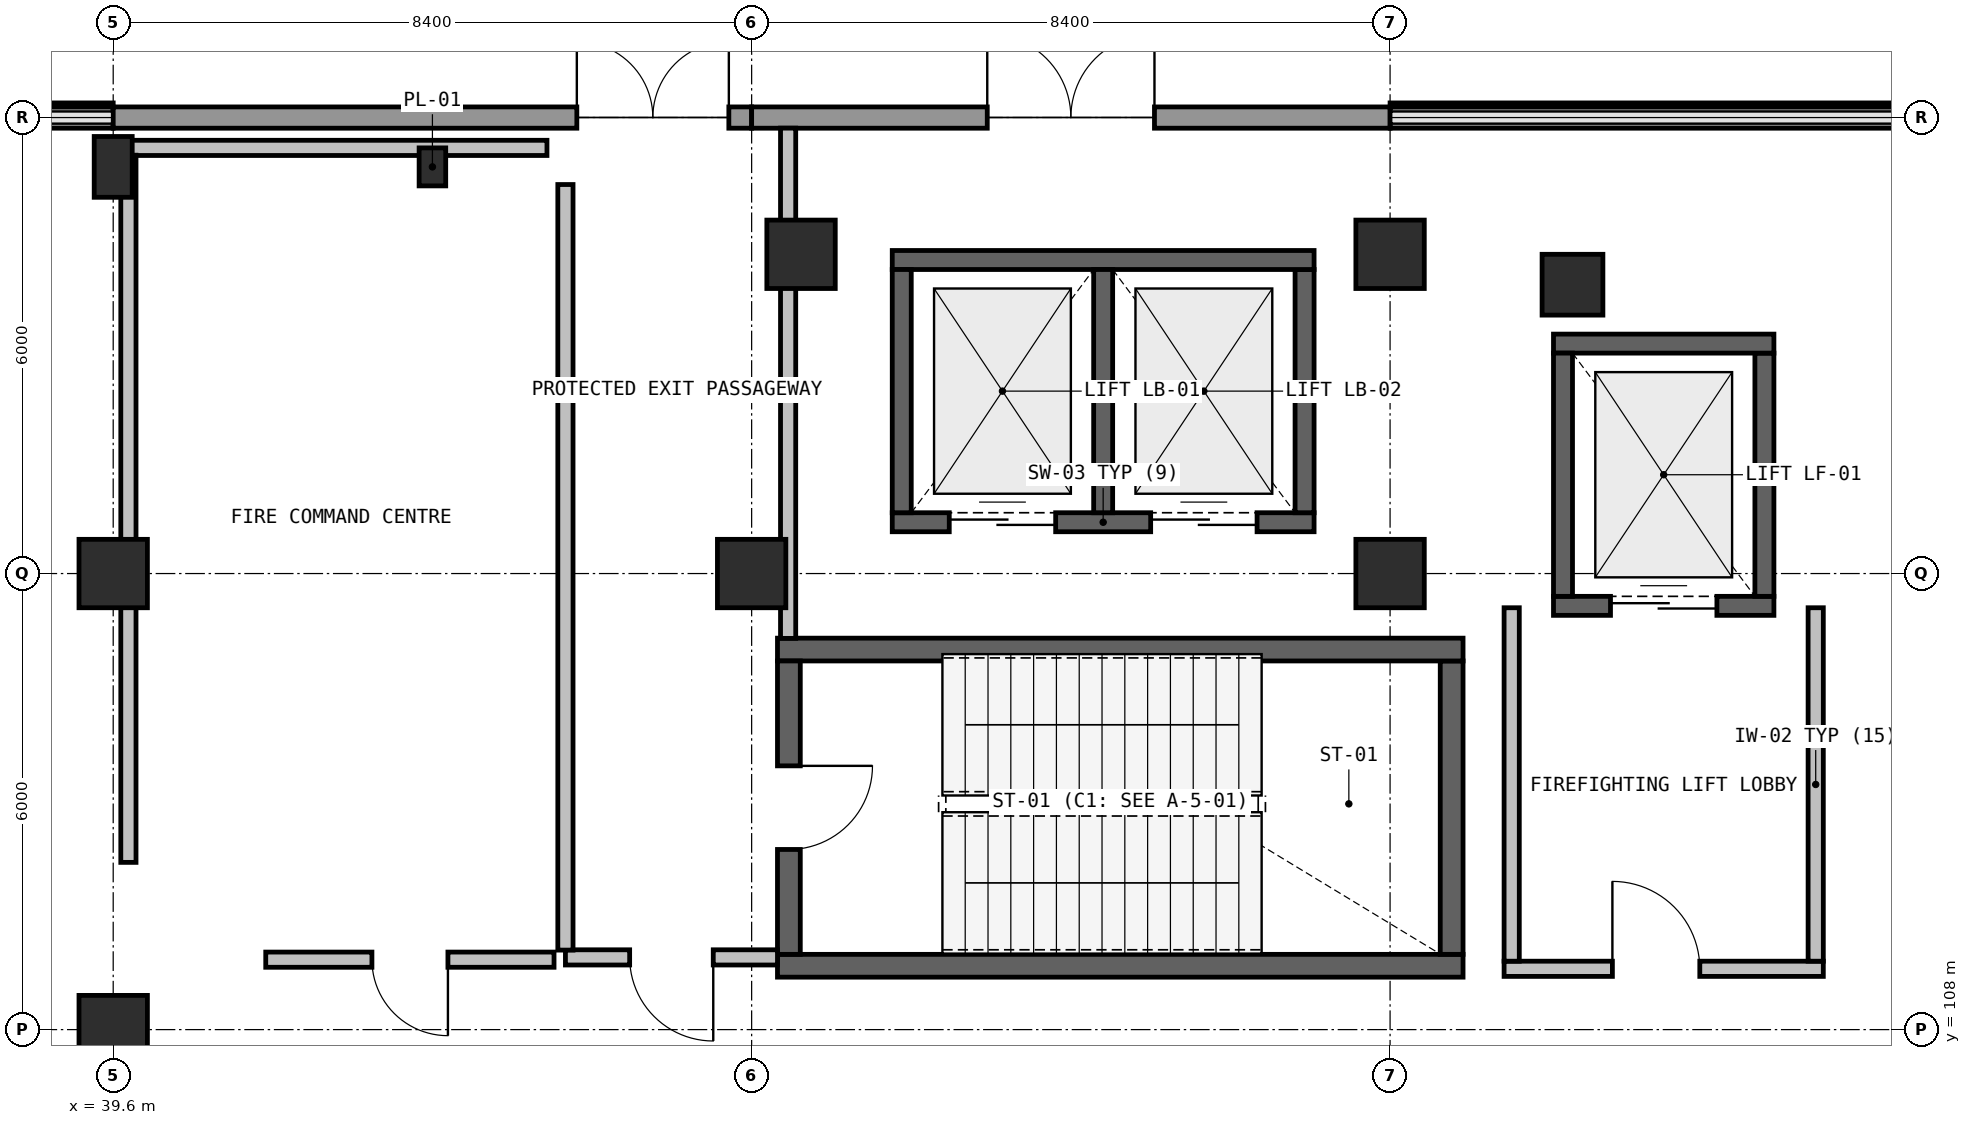
"""IFC4 building model, lengths in metres.
Left out: names, types, materials, properties, quantities, classifications, styles, units other than length and angle.
Written with IfcOpenShell. Run it as: python <this file> out.ifc"""

import sys

from ifc_helpers import new_model, si_unit, direction, frame, frame_2d, origin, origin_2d, place, context, subcontext, project, spatial, rectangle, extrude, element, fill, save


model = new_model("IFC4")
c1 = context("Model", 3, precision=1e-05, world=origin(), true_north=direction((0.0, 1.0)))
c2 = subcontext(c1, "Body", "Model", "MODEL_VIEW")
j1 = project(units=[si_unit("LENGTHUNIT", "METRE"), si_unit("PLANEANGLEUNIT", "RADIAN")], contexts=[c1])
p1 = place(None, origin())
s1 = spatial("IfcSite", under=j1, at=p1, CompositionType="ELEMENT")
p2 = place(p1, origin())
s2 = spatial("IfcBuilding", under=s1, at=p2, CompositionType="ELEMENT")
p3 = place(p2, origin())
s3 = spatial("IfcBuildingStorey", under=s2, at=p3, CompositionType="ELEMENT", Elevation=0.0)
p4 = place(p3, frame((58.8, 117.8, 0.0), z_axis=(0.0, 0.0, 1.0), x_axis=(1.0, 0.0, 0.0)))
e1 = element("IfcColumn", 1, at=p4, inside=s3, PredefinedType="COLUMN", context=c2, shape_type="SweptSolid", body=[
    extrude(rectangle(XDim=0.8, YDim=0.8, at=origin_2d()), origin(), (0.0, 0.0, 1.0), 5.4),
])
for number, where, z_axis, x_axis in (
    (2, (48.65, 118.2, 0.0), (0.0, 0.0, 1.0), (1.0, 0.0, 0.0)),
    (3, (56.4, 118.2, 0.0), (0.0, 0.0, 1.0), (1.0, 0.0, 0.0)),
    (4, (39.6, 108.0, 0.0), (0.0, 0.0, 1.0), (1.0, 0.0, 0.0)),
    (5, (39.6, 114.0, 0.0), (0.0, 0.0, 1.0), (1.0, 0.0, 0.0)),
):
    element("IfcColumn", number, at=place(p3, frame(where, z_axis=z_axis, x_axis=x_axis)), inside=s3, PredefinedType="COLUMN", context=c2, shape_type="SweptSolid", body=[
        extrude(rectangle(XDim=0.9, YDim=0.9, at=origin_2d()), origin(), (0.0, 0.0, 1.0), 5.4),
    ])
p5 = place(p3, frame((39.6, 119.35, 0.0), z_axis=(0.0, 0.0, 1.0), x_axis=(1.0, 0.0, 0.0)))
e6 = element("IfcColumn", 6, at=p5, inside=s3, PredefinedType="COLUMN", context=c2, shape_type="SweptSolid", body=[
    extrude(rectangle(XDim=0.5, YDim=0.8, at=origin_2d()), origin(), (0.0, 0.0, 1.0), 5.4),
])
for number, where, z_axis, x_axis in (
    (7, (48.0, 114.0, 0.0), (0.0, 0.0, 1.0), (1.0, 0.0, 0.0)),
    (8, (56.4, 114.0, 0.0), (0.0, 0.0, 1.0), (1.0, 0.0, 0.0)),
):
    element("IfcColumn", number, at=place(p3, frame(where, z_axis=z_axis, x_axis=x_axis)), inside=s3, PredefinedType="COLUMN", context=c2, shape_type="SweptSolid", body=[
        extrude(rectangle(XDim=0.9, YDim=0.9, at=origin_2d()), origin(), (0.0, 0.0, 1.0), 5.4),
    ])
p6 = place(p3, frame((43.8, 119.35, 0.0), z_axis=(0.0, 0.0, 1.0), x_axis=(1.0, 0.0, 0.0)))
e9 = element("IfcColumn", 9, at=p6, inside=s3, PredefinedType="PILASTER", context=c2, shape_type="SweptSolid", body=[
    extrude(rectangle(XDim=0.35, YDim=0.5, at=origin_2d()), origin(), (0.0, 0.0, 1.0), 5.4),
])
p7 = place(p3, frame((31.202, 119.999, 0.0), z_axis=(0.0, 0.0, 1.0), x_axis=(1.0, 0.0, 0.0)))
e10 = element("IfcWall", 10, at=p7, inside=s3, PredefinedType="SOLIDWALL", context=c2, shape_type="SweptSolid", body=[
    extrude(rectangle(XDim=8.396, YDim=0.28, at=frame_2d((4.198, 0.0))), origin(), (0.0, 0.0, 1.0), 0.94),
])
p8 = place(p3, frame((39.6, 119.999, 0.0), z_axis=(0.0, 0.0, 1.0), x_axis=(1.0, 0.0, 0.0)))
e11 = element("IfcWall", 11, at=p8, inside=s3, PredefinedType="SOLIDWALL", context=c2, shape_type="SweptSolid", body=[
    extrude(rectangle(XDim=8.4, YDim=0.28, at=frame_2d((4.2, 0.0))), origin(), (0.0, 0.0, 1.0), 5.08),
])
p9 = place(p8, frame((6.1, 0.0, 0.0)))
e12 = element("IfcOpeningElement", 12, at=p9, cuts=e11, PredefinedType="OPENING", context=c2, shape_type="SweptSolid", body=[
    extrude(rectangle(XDim=2.0, YDim=2.3, at=frame_2d((1.0, 1.15))), frame((0.0, 0.15, 0.0), z_axis=(0.0, -1.0, 0.0), x_axis=(1.0, 0.0, 0.0)), (0.0, 0.0, 1.0), 0.3),
])
p10 = place(p3, frame((48.0, 119.999, 0.0), z_axis=(0.0, 0.0, 1.0), x_axis=(1.0, 0.0, 0.0)))
e13 = element("IfcWall", 13, at=p10, inside=s3, PredefinedType="SOLIDWALL", context=c2, shape_type="SweptSolid", body=[
    extrude(rectangle(XDim=8.4, YDim=0.28, at=frame_2d((4.2, 0.0))), origin(), (0.0, 0.0, 1.0), 5.08),
])
p11 = place(p10, frame((3.1, 0.0, 0.0)))
e14 = element("IfcOpeningElement", 14, at=p11, cuts=e13, PredefinedType="OPENING", context=c2, shape_type="SweptSolid", body=[
    extrude(rectangle(XDim=2.2, YDim=2.35, at=frame_2d((1.1, 1.175))), frame((0.0, 0.15, 0.0), z_axis=(0.0, -1.0, 0.0), x_axis=(1.0, 0.0, 0.0)), (0.0, 0.0, 1.0), 0.3),
])
p12 = place(p3, frame((56.402, 119.999, 0.0), z_axis=(0.0, 0.0, 1.0), x_axis=(1.0, 0.0, 0.0)))
e15 = element("IfcWall", 15, at=p12, inside=s3, PredefinedType="SOLIDWALL", context=c2, shape_type="SweptSolid", body=[
    extrude(rectangle(XDim=8.396, YDim=0.28, at=frame_2d((4.198, 0.0))), origin(), (0.0, 0.0, 1.0), 0.94),
])
p13 = place(p3, frame((48.34, 108.84, 0.0), z_axis=(0.0, 0.0, 1.0), x_axis=(1.0, 0.0, 0.0)))
e16 = element("IfcWall", 16, at=p13, inside=s3, PredefinedType="SHEAR", context=c2, shape_type="SweptSolid", body=[
    extrude(rectangle(XDim=9.02, YDim=0.3, at=frame_2d((4.51, 0.0))), origin(), (0.0, 0.0, 1.0), 5.08),
])
p14 = place(p3, frame((57.21, 108.99, 0.0), z_axis=(0.0, 0.0, 1.0), x_axis=(0.0, 1.0, 0.0)))
e17 = element("IfcWall", 17, at=p14, inside=s3, PredefinedType="SHEAR", context=c2, shape_type="SweptSolid", body=[
    extrude(rectangle(XDim=3.86, YDim=0.3, at=frame_2d((1.93, 0.0))), origin(), (0.0, 0.0, 1.0), 5.08),
])
p15 = place(p3, frame((57.36, 113.0, 0.0), z_axis=(0.0, 0.0, 1.0), x_axis=(-1.0, 0.0, 0.0)))
e18 = element("IfcWall", 18, at=p15, inside=s3, PredefinedType="SHEAR", context=c2, shape_type="SweptSolid", body=[
    extrude(rectangle(XDim=9.02, YDim=0.3, at=frame_2d((4.51, 0.0))), origin(), (0.0, 0.0, 1.0), 5.08),
])
p16 = place(p3, frame((48.49, 112.85, 0.0), z_axis=(0.0, 0.0, 1.0), x_axis=(0.0, -1.0, 0.0)))
e19 = element("IfcWall", 19, at=p16, inside=s3, PredefinedType="SHEAR", context=c2, shape_type="SweptSolid", body=[
    extrude(rectangle(XDim=3.86, YDim=0.3, at=frame_2d((1.93, 0.0))), origin(), (0.0, 0.0, 1.0), 5.08),
])
p17 = place(p16, frame((1.38, 0.0, 0.0)))
e20 = element("IfcOpeningElement", 20, at=p17, cuts=e19, PredefinedType="OPENING", context=c2, shape_type="SweptSolid", body=[
    extrude(rectangle(XDim=1.1, YDim=2.15, at=frame_2d((0.55, 1.075))), frame((0.0, 0.16, 0.0), z_axis=(0.0, -1.0, 0.0), x_axis=(1.0, 0.0, 0.0)), (0.0, 0.0, 1.0), 0.32),
])
p18 = place(p3, frame((57.9, 108.8, 0.0), z_axis=(0.0, 0.0, 1.0), x_axis=(1.0, 0.0, 0.0)))
e21 = element("IfcWall", 21, at=p18, inside=s3, PredefinedType="SOLIDWALL", context=c2, shape_type="SweptSolid", body=[
    extrude(rectangle(XDim=4.2, YDim=0.2, at=frame_2d((2.1, 0.0))), origin(), (0.0, 0.0, 1.0), 5.08),
])
p19 = place(p18, frame((1.425, 0.0, 0.0)))
e22 = element("IfcOpeningElement", 22, at=p19, cuts=e21, PredefinedType="OPENING", context=c2, shape_type="SweptSolid", body=[
    extrude(rectangle(XDim=1.15, YDim=2.15, at=frame_2d((0.575, 1.075))), frame((0.0, 0.11, 0.0), z_axis=(0.0, -1.0, 0.0), x_axis=(1.0, 0.0, 0.0)), (0.0, 0.0, 1.0), 0.22),
])
for number, where, z_axis, x_axis in (
    (23, (62.0, 108.9, 0.0), (0.0, 0.0, 1.0), (0.0, 1.0, 0.0)),
    (24, (58.0, 113.55, 0.0), (0.0, 0.0, 1.0), (0.0, -1.0, 0.0)),
):
    element("IfcWall", number, at=place(p3, frame(where, z_axis=z_axis, x_axis=x_axis)), inside=s3, PredefinedType="SOLIDWALL", context=c2, shape_type="SweptSolid", body=[
        extrude(rectangle(XDim=4.65, YDim=0.2, at=frame_2d((2.325, 0.0))), origin(), (0.0, 0.0, 1.0), 5.08),
    ])
p20 = place(p3, frame((58.55, 113.575, 0.0), z_axis=(0.0, 0.0, 1.0), x_axis=(1.0, 0.0, 0.0)))
e25 = element("IfcWall", 25, at=p20, inside=s3, PredefinedType="SHEAR", context=c2, shape_type="SweptSolid", body=[
    extrude(rectangle(XDim=2.9, YDim=0.25, at=frame_2d((1.45, 0.0))), origin(), (0.0, 0.0, 1.0), 5.08),
])
p21 = place(p20, frame((0.75, 0.0, 0.0)))
e26 = element("IfcOpeningElement", 26, at=p21, cuts=e25, PredefinedType="OPENING", context=c2, shape_type="SweptSolid", body=[
    extrude(rectangle(XDim=1.4, YDim=2.15, at=frame_2d((0.7, 1.075))), frame((0.0, 0.135, 0.0), z_axis=(0.0, -1.0, 0.0), x_axis=(1.0, 0.0, 0.0)), (0.0, 0.0, 1.0), 0.27),
])
p22 = place(p3, frame((61.325, 113.7, 0.0), z_axis=(0.0, 0.0, 1.0), x_axis=(0.0, 1.0, 0.0)))
e27 = element("IfcWall", 27, at=p22, inside=s3, PredefinedType="SHEAR", context=c2, shape_type="SweptSolid", body=[
    extrude(rectangle(XDim=3.2, YDim=0.25, at=frame_2d((1.6, 0.0))), origin(), (0.0, 0.0, 1.0), 5.08),
])
p23 = place(p3, frame((61.45, 117.025, 0.0), z_axis=(0.0, 0.0, 1.0), x_axis=(-1.0, 0.0, 0.0)))
e28 = element("IfcWall", 28, at=p23, inside=s3, PredefinedType="SHEAR", context=c2, shape_type="SweptSolid", body=[
    extrude(rectangle(XDim=2.9, YDim=0.25, at=frame_2d((1.45, 0.0))), origin(), (0.0, 0.0, 1.0), 5.08),
])
p24 = place(p3, frame((58.675, 116.9, 0.0), z_axis=(0.0, 0.0, 1.0), x_axis=(0.0, -1.0, 0.0)))
e29 = element("IfcWall", 29, at=p24, inside=s3, PredefinedType="SHEAR", context=c2, shape_type="SweptSolid", body=[
    extrude(rectangle(XDim=3.2, YDim=0.25, at=frame_2d((1.6, 0.0))), origin(), (0.0, 0.0, 1.0), 5.08),
])
p25 = place(p3, frame((49.85, 114.675, 0.0), z_axis=(0.0, 0.0, 1.0), x_axis=(1.0, 0.0, 0.0)))
e30 = element("IfcWall", 30, at=p25, inside=s3, PredefinedType="SHEAR", context=c2, shape_type="SweptSolid", body=[
    extrude(rectangle(XDim=5.55, YDim=0.25, at=frame_2d((2.775, 0.0))), origin(), (0.0, 0.0, 1.0), 5.08),
])
p26 = place(p25, frame((0.75, 0.0, 0.0)))
e31 = element("IfcOpeningElement", 31, at=p26, cuts=e30, PredefinedType="OPENING", context=c2, shape_type="SweptSolid", body=[
    extrude(rectangle(XDim=1.4, YDim=2.2, at=frame_2d((0.7, 1.1))), frame((0.0, 0.135, 0.0), z_axis=(0.0, -1.0, 0.0), x_axis=(1.0, 0.0, 0.0)), (0.0, 0.0, 1.0), 0.27),
])
p27 = place(p25, frame((3.4, 0.0, 0.0)))
e32 = element("IfcOpeningElement", 32, at=p27, cuts=e30, PredefinedType="OPENING", context=c2, shape_type="SweptSolid", body=[
    extrude(rectangle(XDim=1.4, YDim=2.2, at=frame_2d((0.7, 1.1))), frame((0.0, 0.135, 0.0), z_axis=(0.0, -1.0, 0.0), x_axis=(1.0, 0.0, 0.0)), (0.0, 0.0, 1.0), 0.27),
])
p28 = place(p3, frame((55.275, 114.8, 0.0), z_axis=(0.0, 0.0, 1.0), x_axis=(0.0, 1.0, 0.0)))
e33 = element("IfcWall", 33, at=p28, inside=s3, PredefinedType="SHEAR", context=c2, shape_type="SweptSolid", body=[
    extrude(rectangle(XDim=3.2, YDim=0.25, at=frame_2d((1.6, 0.0))), origin(), (0.0, 0.0, 1.0), 5.08),
])
p29 = place(p3, frame((55.4, 118.125, 0.0), z_axis=(0.0, 0.0, 1.0), x_axis=(-1.0, 0.0, 0.0)))
e34 = element("IfcWall", 34, at=p29, inside=s3, PredefinedType="SHEAR", context=c2, shape_type="SweptSolid", body=[
    extrude(rectangle(XDim=5.55, YDim=0.25, at=frame_2d((2.775, 0.0))), origin(), (0.0, 0.0, 1.0), 5.08),
])
for number, where, z_axis, x_axis in (
    (35, (49.975, 118.0, 0.0), (0.0, 0.0, 1.0), (0.0, -1.0, 0.0)),
    (36, (52.625, 114.8, 0.0), (0.0, 0.0, 1.0), (0.0, 1.0, 0.0)),
):
    element("IfcWall", number, at=place(p3, frame(where, z_axis=z_axis, x_axis=x_axis)), inside=s3, PredefinedType="SHEAR", context=c2, shape_type="SweptSolid", body=[
        extrude(rectangle(XDim=3.2, YDim=0.25, at=frame_2d((1.6, 0.0))), origin(), (0.0, 0.0, 1.0), 5.08),
    ])
p30 = place(p3, frame((48.48, 119.86, 0.0), z_axis=(0.0, 0.0, 1.0), x_axis=(0.0, -1.0, 0.0)))
e37 = element("IfcWall", 37, at=p30, inside=s3, PredefinedType="SOLIDWALL", context=c2, shape_type="SweptSolid", body=[
    extrude(rectangle(XDim=6.713, YDim=0.2, at=frame_2d((3.356, 0.0))), origin(), (0.0, 0.0, 1.0), 5.08),
])
p31 = place(p3, frame((48.34, 108.95, 0.0), z_axis=(0.0, 0.0, 1.0), x_axis=(-1.0, 0.0, 0.0)))
e38 = element("IfcWall", 38, at=p31, inside=s3, PredefinedType="SOLIDWALL", context=c2, shape_type="SweptSolid", body=[
    extrude(rectangle(XDim=2.79, YDim=0.2, at=frame_2d((1.395, 0.0))), origin(), (0.0, 0.0, 1.0), 5.08),
])
p32 = place(p31, frame((0.845, 0.0, 0.0)))
e39 = element("IfcOpeningElement", 39, at=p32, cuts=e38, PredefinedType="OPENING", context=c2, shape_type="SweptSolid", body=[
    extrude(rectangle(XDim=1.1, YDim=2.15, at=frame_2d((0.55, 1.075))), frame((0.0, 0.11, 0.0), z_axis=(0.0, -1.0, 0.0), x_axis=(1.0, 0.0, 0.0)), (0.0, 0.0, 1.0), 0.22),
])
p33 = place(p3, frame((45.55, 109.046, 0.0), z_axis=(0.0, 0.0, 1.0), x_axis=(0.0, 1.0, 0.0)))
e40 = element("IfcWall", 40, at=p33, inside=s3, PredefinedType="SOLIDWALL", context=c2, shape_type="SweptSolid", body=[
    extrude(rectangle(XDim=10.072, YDim=0.2, at=frame_2d((5.036, 0.0))), origin(), (0.0, 0.0, 1.0), 5.08),
])
p34 = place(p3, frame((39.761, 119.6, 0.0), z_axis=(0.0, 0.0, 1.0), x_axis=(1.0, 0.0, 0.0)))
e41 = element("IfcWall", 41, at=p34, inside=s3, PredefinedType="SOLIDWALL", context=c2, shape_type="SweptSolid", body=[
    extrude(rectangle(XDim=5.546, YDim=0.2, at=frame_2d((2.773, 0.0))), origin(), (0.0, 0.0, 1.0), 5.08),
])
p35 = place(p3, frame((45.4, 108.92, 0.0), z_axis=(0.0, 0.0, 1.0), x_axis=(-1.0, 0.0, 0.0)))
e42 = element("IfcWall", 42, at=p35, inside=s3, PredefinedType="SOLIDWALL", context=c2, shape_type="SweptSolid", body=[
    extrude(rectangle(XDim=3.793, YDim=0.2, at=frame_2d((1.896, 0.0))), origin(), (0.0, 0.0, 1.0), 5.08),
])
p36 = place(p35, frame((1.396, 0.0, 0.0)))
e43 = element("IfcOpeningElement", 43, at=p36, cuts=e42, PredefinedType="OPENING", context=c2, shape_type="SweptSolid", body=[
    extrude(rectangle(XDim=1.0, YDim=2.15, at=frame_2d((0.5, 1.075))), frame((0.0, 0.11, 0.0), z_axis=(0.0, -1.0, 0.0), x_axis=(1.0, 0.0, 0.0)), (0.0, 0.0, 1.0), 0.22),
])
p37 = place(p3, frame((39.8, 110.2, 0.0), z_axis=(0.0, 0.0, 1.0), x_axis=(0.0, 1.0, 0.0)))
e44 = element("IfcWall", 44, at=p37, inside=s3, PredefinedType="SOLIDWALL", context=c2, shape_type="SweptSolid", body=[
    extrude(rectangle(XDim=9.304, YDim=0.2, at=frame_2d((4.652, 0.0))), origin(), (0.0, 0.0, 1.0), 4.33),
])
p38 = place(p9, origin())
e45 = element("IfcDoor", 45, at=p38, inside=s3, OperationType="DOUBLE_DOOR_SINGLE_SWING", PredefinedType="DOOR", context=c2, shape_type="SweptSolid", body=[
    extrude(rectangle(XDim=2.0, YDim=2.3, at=frame_2d((1.0, 1.15))), frame((0.0, 0.025, 0.0), z_axis=(0.0, -1.0, 0.0), x_axis=(1.0, 0.0, 0.0)), (0.0, 0.0, 1.0), 0.05),
])
fill(e12, e45)
p39 = place(p11, origin())
e46 = element("IfcDoor", 46, at=p39, inside=s3, OperationType="DOUBLE_DOOR_SINGLE_SWING", PredefinedType="DOOR", context=c2, shape_type="SweptSolid", body=[
    extrude(rectangle(XDim=2.2, YDim=2.35, at=frame_2d((1.1, 1.175))), frame((0.0, 0.025, 0.0), z_axis=(0.0, -1.0, 0.0), x_axis=(1.0, 0.0, 0.0)), (0.0, 0.0, 1.0), 0.05),
])
fill(e14, e46)
p40 = place(p17, origin())
e47 = element("IfcDoor", 47, at=p40, inside=s3, OperationType="SINGLE_SWING_RIGHT", PredefinedType="DOOR", context=c2, shape_type="SweptSolid", body=[
    extrude(rectangle(XDim=1.1, YDim=2.15, at=frame_2d((0.55, 1.075))), frame((0.0, 0.025, 0.0), z_axis=(0.0, -1.0, 0.0), x_axis=(1.0, 0.0, 0.0)), (0.0, 0.0, 1.0), 0.05),
])
fill(e20, e47)
p41 = place(p19, origin())
e48 = element("IfcDoor", 48, at=p41, inside=s3, OperationType="SINGLE_SWING_LEFT", PredefinedType="DOOR", context=c2, shape_type="SweptSolid", body=[
    extrude(rectangle(XDim=1.15, YDim=2.15, at=frame_2d((0.575, 1.075))), frame((0.0, 0.025, 0.0), z_axis=(0.0, -1.0, 0.0), x_axis=(1.0, 0.0, 0.0)), (0.0, 0.0, 1.0), 0.05),
])
fill(e22, e48)
p42 = place(p21, origin())
e49 = element("IfcDoor", 49, at=p42, inside=s3, OperationType="DOUBLE_DOOR_SLIDING", PredefinedType="DOOR", context=c2, shape_type="SweptSolid", body=[
    extrude(rectangle(XDim=1.4, YDim=2.15, at=frame_2d((0.7, 1.075))), frame((0.0, 0.025, 0.0), z_axis=(0.0, -1.0, 0.0), x_axis=(1.0, 0.0, 0.0)), (0.0, 0.0, 1.0), 0.05),
])
fill(e26, e49)
p43 = place(p26, origin())
e50 = element("IfcDoor", 50, at=p43, inside=s3, OperationType="DOUBLE_DOOR_SLIDING", PredefinedType="DOOR", context=c2, shape_type="SweptSolid", body=[
    extrude(rectangle(XDim=1.4, YDim=2.2, at=frame_2d((0.7, 1.1))), frame((0.0, 0.025, 0.0), z_axis=(0.0, -1.0, 0.0), x_axis=(1.0, 0.0, 0.0)), (0.0, 0.0, 1.0), 0.05),
])
fill(e31, e50)
p44 = place(p27, origin())
e51 = element("IfcDoor", 51, at=p44, inside=s3, OperationType="DOUBLE_DOOR_SLIDING", PredefinedType="DOOR", context=c2, shape_type="SweptSolid", body=[
    extrude(rectangle(XDim=1.4, YDim=2.2, at=frame_2d((0.7, 1.1))), frame((0.0, 0.025, 0.0), z_axis=(0.0, -1.0, 0.0), x_axis=(1.0, 0.0, 0.0)), (0.0, 0.0, 1.0), 0.05),
])
fill(e32, e51)
p45 = place(p32, origin())
e52 = element("IfcDoor", 52, at=p45, inside=s3, OperationType="SINGLE_SWING_LEFT", PredefinedType="DOOR", context=c2, shape_type="SweptSolid", body=[
    extrude(rectangle(XDim=1.1, YDim=2.15, at=frame_2d((0.55, 1.075))), frame((0.0, 0.025, 0.0), z_axis=(0.0, -1.0, 0.0), x_axis=(1.0, 0.0, 0.0)), (0.0, 0.0, 1.0), 0.05),
])
fill(e39, e52)
p46 = place(p36, origin())
e53 = element("IfcDoor", 53, at=p46, inside=s3, OperationType="SINGLE_SWING_RIGHT", PredefinedType="DOOR", context=c2, shape_type="SweptSolid", body=[
    extrude(rectangle(XDim=1.0, YDim=2.15, at=frame_2d((0.5, 1.075))), frame((0.0, 0.025, 0.0), z_axis=(0.0, -1.0, 0.0), x_axis=(1.0, 0.0, 0.0)), (0.0, 0.0, 1.0), 0.05),
])
fill(e43, e53)
save(model, sys.argv[1])
